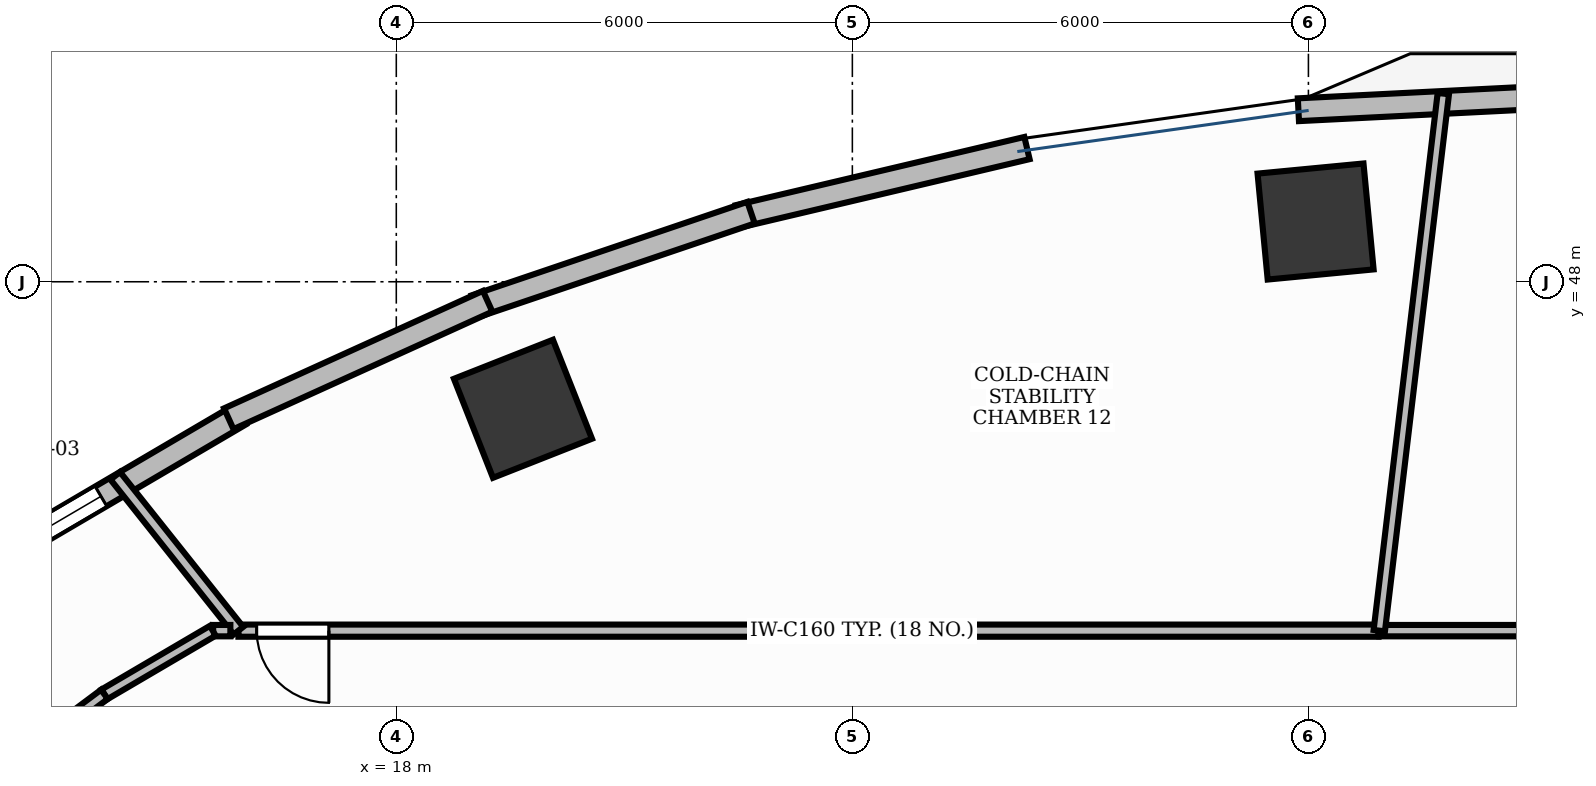
"""IFC4 building model, lengths in metres.
Left out: names, types, materials, properties, quantities, classifications, styles, units other than length and angle.
Written with IfcOpenShell. Run it as: python <this file> out.ifc"""

import sys

from ifc_helpers import new_model, si_unit, direction, frame, frame_2d, origin, origin_2d, place, context, subcontext, project, spatial, rectangle, extrude, element, fill, save


model = new_model("IFC4")
c1 = context("Model", 3, precision=1e-05, world=origin(), true_north=direction((0.0, 1.0)))
c2 = subcontext(c1, "Body", "Model", "MODEL_VIEW")
j1 = project(units=[si_unit("LENGTHUNIT", "METRE"), si_unit("PLANEANGLEUNIT", "RADIAN")], contexts=[c1])
p1 = place(None, origin())
s1 = spatial("IfcSite", under=j1, at=p1, CompositionType="ELEMENT")
p2 = place(p1, origin())
s2 = spatial("IfcBuilding", under=s1, at=p2, CompositionType="ELEMENT")
p3 = place(p2, frame((0.0, 0.0, 76.2)))
s3 = spatial("IfcBuildingStorey", under=s2, at=p3, CompositionType="ELEMENT", Elevation=76.2)
for number, where, z_axis, x_axis in (
    (1, (30.094, 48.792, -0.0), (0.0, 0.0, 1.0), (0.995, 0.095, 0.0)),
    (2, (19.667, 46.329, -0.0), (0.0, 0.0, 1.0), (0.93, 0.367, 0.0)),
):
    element("IfcColumn", number, at=place(p3, frame(where, z_axis=z_axis, x_axis=x_axis)), inside=s3, PredefinedType="COLUMN", context=c2, shape_type="SweptSolid", body=[
        extrude(rectangle(XDim=1.4, YDim=1.4, at=origin_2d()), origin(), (0.0, 0.0, 1.0), 3.901),
    ])
p4 = place(p3, frame((15.944, 46.25, 0.0), z_axis=(0.0, 0.0, 1.0), x_axis=(-0.862473134325, -0.506102847817, 0.0)))
e3 = element("IfcWall", 3, at=p4, inside=s3, PredefinedType="STANDARD", context=c2, shape_type="SweptSolid", body=[
    extrude(rectangle(XDim=3.595, YDim=0.3, at=frame_2d((1.798, 0.0))), origin(), (0.0, 0.0, 1.0), 3.9),
])
p5 = place(p4, frame((2.12, 0.0, 0.9)))
e4 = element("IfcOpeningElement", 4, at=p5, cuts=e3, PredefinedType="OPENING", context=c2, shape_type="SweptSolid", body=[
    extrude(rectangle(XDim=1.2, YDim=2.7, at=frame_2d((0.6, 1.35))), frame((0.0, 0.165, 0.0), z_axis=(0.0, -1.0, 0.0), x_axis=(1.0, 0.0, 0.0)), (0.0, 0.0, 1.0), 0.33),
])
p6 = place(p3, frame((33.84, 50.463, 0.0), z_axis=(0.0, 0.0, 1.0), x_axis=(-0.998732359232, -0.050335619826, 0.0)))
e5 = element("IfcWall", 5, at=p6, inside=s3, PredefinedType="STANDARD", context=c2, shape_type="SweptSolid", body=[
    extrude(rectangle(XDim=3.977, YDim=0.3, at=frame_2d((1.989, 0.0))), origin(), (0.0, 0.0, 1.0), 3.47),
])
p7 = place(p3, frame((26.297, 49.759, 0.0), z_axis=(0.0, 0.0, 1.0), x_axis=(-0.973197600754, -0.229970497863, 0.0)))
e6 = element("IfcWall", 6, at=p7, inside=s3, PredefinedType="STANDARD", context=c2, shape_type="SweptSolid", body=[
    extrude(rectangle(XDim=3.901, YDim=0.3, at=frame_2d((1.951, 0.0))), origin(), (0.0, 0.0, 1.0), 3.9),
])
p8 = place(p3, frame((22.667, 48.909, 0.0), z_axis=(0.0, 0.0, 1.0), x_axis=(-0.94702579403, -0.321157508773, 0.0)))
e7 = element("IfcWall", 7, at=p8, inside=s3, PredefinedType="STANDARD", context=c2, shape_type="SweptSolid", body=[
    extrude(rectangle(XDim=3.83, YDim=0.3, at=frame_2d((1.915, 0.0))), origin(), (0.0, 0.0, 1.0), 3.9),
])
p9 = place(p3, frame((19.201, 47.743, 0.0), z_axis=(0.0, 0.0, 1.0), x_axis=(-0.910623406862, -0.413237233166, 0.0)))
e8 = element("IfcWall", 8, at=p9, inside=s3, PredefinedType="STANDARD", context=c2, shape_type="SweptSolid", body=[
    extrude(rectangle(XDim=3.74, YDim=0.3, at=frame_2d((1.87, 0.0))), origin(), (0.0, 0.0, 1.0), 3.9),
])
p10 = place(p3, frame((42.242, 43.41, 0.0), z_axis=(0.0, 0.0, 1.0), x_axis=(-1.0, 0.0, 0.0)))
e9 = element("IfcWall", 9, at=p10, inside=s3, PredefinedType="PARTITIONING", context=c2, shape_type="SweptSolid", body=[
    extrude(rectangle(XDim=11.31, YDim=0.15, at=frame_2d((5.655, 0.0))), origin(), (0.0, 0.0, 1.0), 2.91),
])
p11 = place(p10, frame((6.241, 0.0, 0.0)))
e10 = element("IfcOpeningElement", 10, at=p11, cuts=e9, PredefinedType="OPENING", context=c2, shape_type="SweptSolid", body=[
    extrude(rectangle(XDim=0.95, YDim=2.15, at=frame_2d((0.475, 1.075))), frame((0.0, 0.09, 0.0), z_axis=(0.0, -1.0, 0.0), x_axis=(1.0, 0.0, 0.0)), (0.0, 0.0, 1.0), 0.18),
])
p12 = place(p3, frame((30.922, 43.41, 0.0), z_axis=(0.0, 0.0, 1.0), x_axis=(-1.0, 0.0, 0.0)))
e11 = element("IfcWall", 11, at=p12, inside=s3, PredefinedType="PARTITIONING", context=c2, shape_type="SweptSolid", body=[
    extrude(rectangle(XDim=14.999, YDim=0.16, at=frame_2d((7.5, 0.0))), origin(), (0.0, 0.0, 1.0), 2.91),
])
p13 = place(p12, frame((13.809, 0.0, 0.0)))
e12 = element("IfcOpeningElement", 12, at=p13, cuts=e11, PredefinedType="OPENING", context=c2, shape_type="SweptSolid", body=[
    extrude(rectangle(XDim=0.95, YDim=2.15, at=frame_2d((0.475, 1.075))), frame((0.0, 0.095, 0.0), z_axis=(0.0, -1.0, 0.0), x_axis=(1.0, 0.0, 0.0)), (0.0, 0.0, 1.0), 0.19),
])
p14 = place(p3, frame((30.932, 43.41, 0.0), z_axis=(0.0, 0.0, 1.0), x_axis=(0.118403788483, 0.992965529549, 0.0)))
e13 = element("IfcWall", 13, at=p14, inside=s3, PredefinedType="PARTITIONING", context=c2, shape_type="SweptSolid", body=[
    extrude(rectangle(XDim=7.116, YDim=0.15, at=frame_2d((3.558, 0.0))), origin(), (0.0, 0.0, 1.0), 2.91),
])
p15 = place(p3, frame((15.923, 43.41, 0.0), z_axis=(0.0, 0.0, 1.0), x_axis=(-0.622507898818, 0.782613516309, 0.0)))
e14 = element("IfcWall", 14, at=p15, inside=s3, PredefinedType="PARTITIONING", context=c2, shape_type="SweptSolid", body=[
    extrude(rectangle(XDim=2.603, YDim=0.16, at=frame_2d((1.302, 0.0))), origin(), (0.0, 0.0, 1.0), 2.91),
])
p16 = place(p3, frame((15.817, 43.41, 0.0), z_axis=(0.0, 0.0, 1.0), x_axis=(-1.0, 0.0, 0.0)))
e15 = element("IfcWall", 15, at=p16, inside=s3, PredefinedType="PARTITIONING", context=c2, shape_type="SweptSolid", body=[
    extrude(rectangle(XDim=0.226, YDim=0.15, at=frame_2d((0.113, 0.0))), origin(), (0.0, 0.0, 1.0), 2.91),
])
p17 = place(p3, frame((15.586, 43.409, 0.0), z_axis=(0.0, 0.0, 1.0), x_axis=(-0.862446636904, -0.506148000582, 0.0)))
e16 = element("IfcWall", 16, at=p17, inside=s3, PredefinedType="PARTITIONING", context=c2, shape_type="SweptSolid", body=[
    extrude(rectangle(XDim=1.652, YDim=0.15, at=frame_2d((0.826, 0.0))), origin(), (0.0, 0.0, 1.0), 2.91),
])
p18 = place(p3, frame((14.16, 42.572, 0.0), z_axis=(0.0, 0.0, 1.0), x_axis=(-0.800808090092, -0.598921032227, 0.0)))
e17 = element("IfcWall", 17, at=p18, inside=s3, PredefinedType="PARTITIONING", context=c2, shape_type="SweptSolid", body=[
    extrude(rectangle(XDim=3.079, YDim=0.15, at=frame_2d((1.54, 0.0))), origin(), (0.0, 0.0, 1.0), 2.91),
])
p19 = place(p5, origin())
e18 = element("IfcWindow", 18, at=p19, inside=s3, PartitioningType="SINGLE_PANEL", PredefinedType="WINDOW", context=c2, shape_type="SweptSolid", body=[
    extrude(rectangle(XDim=1.2, YDim=2.7, at=frame_2d((0.6, 1.35))), frame((0.0, 0.03, 0.0), z_axis=(0.0, -1.0, 0.0), x_axis=(1.0, 0.0, 0.0)), (0.0, 0.0, 1.0), 0.06),
])
fill(e4, e18)
p20 = place(p13, origin())
e19 = element("IfcDoor", 19, at=p20, inside=s3, OperationType="SINGLE_SWING_LEFT", PredefinedType="DOOR", context=c2, shape_type="SweptSolid", body=[
    extrude(rectangle(XDim=0.95, YDim=2.15, at=frame_2d((0.475, 1.075))), frame((0.0, 0.025, 0.0), z_axis=(0.0, -1.0, 0.0), x_axis=(1.0, 0.0, 0.0)), (0.0, 0.0, 1.0), 0.05),
])
fill(e12, e19)
save(model, sys.argv[1])
